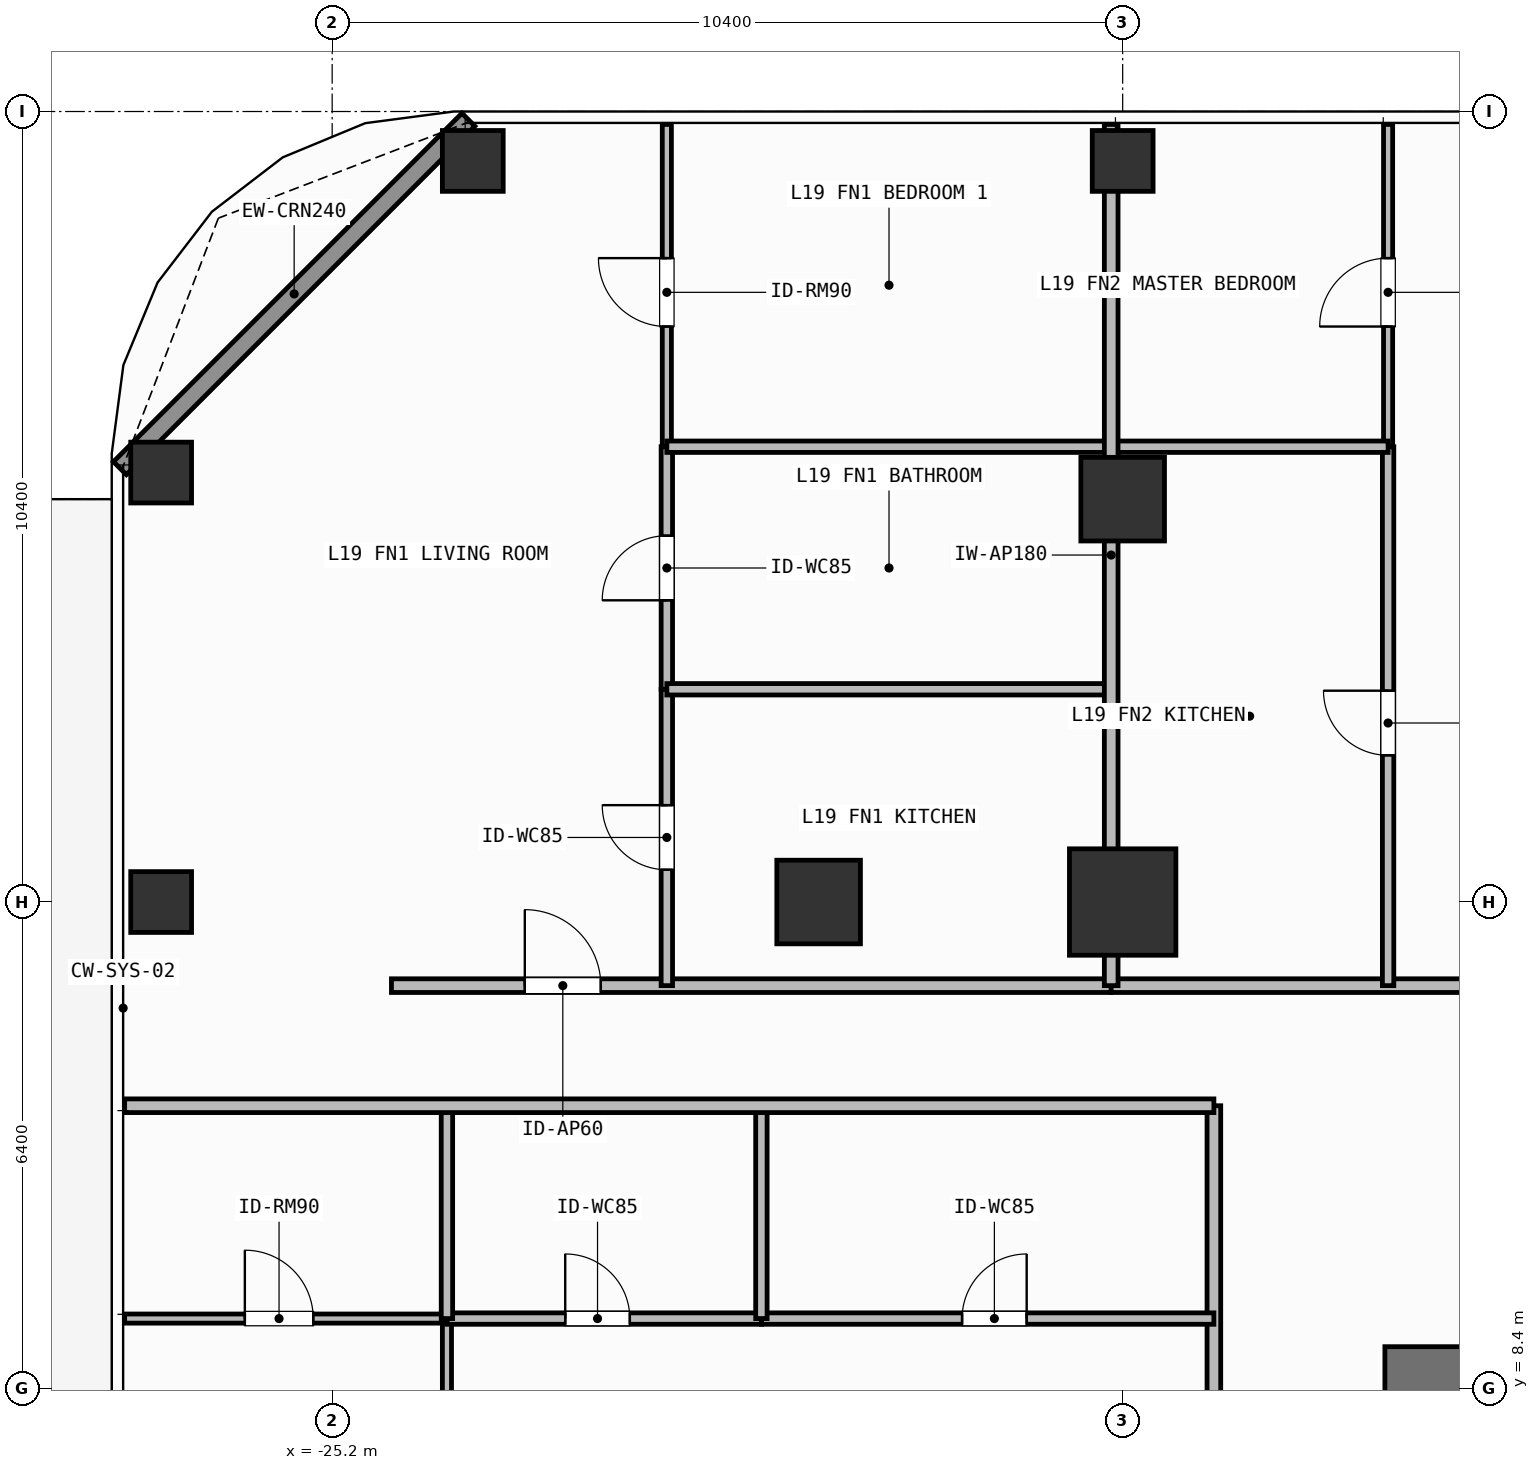
"""IFC4 building model, lengths in metres.
Left out: names, types, materials, properties, quantities, classifications, styles, units other than length and angle.
Written with IfcOpenShell. Run it as: python <this file> out.ifc"""

import sys

from ifc_helpers import new_model, si_unit, direction, frame, frame_2d, origin, origin_2d, place, context, subcontext, project, spatial, rectangle, hollow_rectangle, extrude, element, fill, save


model = new_model("IFC4")
c1 = context("Model", 3, precision=1e-05, world=origin(), true_north=direction((0.0, 1.0)))
c2 = subcontext(c1, "Body", "Model", "MODEL_VIEW")
j1 = project(units=[si_unit("LENGTHUNIT", "METRE"), si_unit("PLANEANGLEUNIT", "RADIAN")], contexts=[c1])
p1 = place(None, origin())
s1 = spatial("IfcSite", under=j1, at=p1, CompositionType="ELEMENT")
p2 = place(p1, origin())
s2 = spatial("IfcBuilding", under=s1, at=p2, CompositionType="ELEMENT")
p3 = place(p2, frame((0.0, 0.0, 73.5)))
s3 = spatial("IfcBuildingStorey", under=s2, at=p3, CompositionType="ELEMENT", Elevation=73.5)
p4 = place(p3, frame((-11.35, 8.4, 0.0), z_axis=(0.0, 0.0, 1.0), x_axis=(1.0, 0.0, 0.0)))
e1 = element("IfcWall", 1, at=p4, inside=s3, PredefinedType="SHEAR", context=c2, shape_type="SweptSolid", body=[
    extrude(rectangle(XDim=1.65, YDim=1.1, at=frame_2d((0.825, 0.0))), origin(), (0.0, 0.0, 1.0), 3.9),
])
p5 = place(p3, frame((-14.8, 14.8, 0.0), z_axis=(0.0, 0.0, 1.0), x_axis=(1.0, 0.0, 0.0)))
e2 = element("IfcColumn", 2, at=p5, inside=s3, PredefinedType="COLUMN", context=c2, shape_type="SweptSolid", body=[
    extrude(rectangle(XDim=1.4, YDim=1.4, at=origin_2d()), origin(), (0.0, 0.0, 1.0), 3.9),
])
for number, where, z_axis, x_axis in (
    (3, (-18.8, 14.8, 0.0), (0.0, 0.0, 1.0), (1.0, 0.0, 0.0)),
    (4, (-14.8, 20.1, 0.0), (0.0, 0.0, 1.0), (1.0, 0.0, 0.0)),
):
    element("IfcColumn", number, at=place(p3, frame(where, z_axis=z_axis, x_axis=x_axis)), inside=s3, PredefinedType="COLUMN", context=c2, shape_type="SweptSolid", body=[
        extrude(rectangle(XDim=1.1, YDim=1.1, at=origin_2d()), origin(), (0.0, 0.0, 1.0), 3.9),
    ])
for number, where, z_axis, x_axis in (
    (5, (-23.35, 24.55, 0.0), (0.0, 0.0, 1.0), (1.0, 0.0, 0.0)),
    (6, (-27.45, 20.45, 0.0), (0.0, 0.0, 1.0), (1.0, 0.0, 0.0)),
    (7, (-14.8, 24.55, 0.0), (0.0, 0.0, 1.0), (1.0, 0.0, 0.0)),
    (8, (-27.45, 14.8, 0.0), (0.0, 0.0, 1.0), (1.0, 0.0, 0.0)),
):
    element("IfcColumn", number, at=place(p3, frame(where, z_axis=z_axis, x_axis=x_axis)), inside=s3, PredefinedType="COLUMN", context=c2, shape_type="SweptSolid", body=[
        extrude(hollow_rectangle(XDim=0.8, YDim=0.8, WallThickness=0.036, at=origin_2d()), origin(), (0.0, 0.0, 1.0), 3.9),
    ])
p6 = place(p3, frame((-27.992, 20.508, 0.0), z_axis=(0.0, 0.0, 1.0), x_axis=(0.707106781187, 0.707106781187, 0.0)))
e9 = element("IfcWall", 9, at=p6, inside=s3, PredefinedType="SOLIDWALL", context=c2, shape_type="SweptSolid", body=[
    extrude(rectangle(XDim=6.484, YDim=0.24, at=frame_2d((3.242, 0.0))), origin(), (0.0, 0.0, 1.0), 3.6),
])
p7 = place(p3, frame((-24.42, 13.7, 0.0), z_axis=(0.0, 0.0, 1.0), x_axis=(1.0, 0.0, 0.0)))
e10 = element("IfcWall", 10, at=p7, inside=s3, PredefinedType="PARTITIONING", context=c2, shape_type="SweptSolid", body=[
    extrude(rectangle(XDim=9.469, YDim=0.18, at=frame_2d((4.734, 0.0))), origin(), (0.0, 0.0, 1.0), 3.6),
])
p8 = place(p7, frame((1.754, 0.0, 0.0)))
e11 = element("IfcOpeningElement", 11, at=p8, cuts=e10, PredefinedType="OPENING", context=c2, shape_type="SweptSolid", body=[
    extrude(rectangle(XDim=1.0, YDim=2.2, at=frame_2d((0.5, 1.1))), frame((0.0, 0.1, 0.0), z_axis=(0.0, -1.0, 0.0), x_axis=(1.0, 0.0, 0.0)), (0.0, 0.0, 1.0), 0.2),
])
p9 = place(p3, frame((-20.797, 13.7, 0.0), z_axis=(0.0, 0.0, 1.0), x_axis=(0.0, 1.0, 0.0)))
e12 = element("IfcWall", 12, at=p9, inside=s3, PredefinedType="PARTITIONING", context=c2, shape_type="SweptSolid", body=[
    extrude(rectangle(XDim=3.899, YDim=0.15, at=frame_2d((1.95, 0.0))), origin(), (0.0, 0.0, 1.0), 3.6),
])
p10 = place(p9, frame((1.524, 0.0, 0.0)))
e13 = element("IfcOpeningElement", 13, at=p10, cuts=e12, PredefinedType="OPENING", context=c2, shape_type="SweptSolid", body=[
    extrude(rectangle(XDim=0.85, YDim=2.1, at=frame_2d((0.425, 1.05))), frame((0.0, 0.085, 0.0), z_axis=(0.0, -1.0, 0.0), x_axis=(1.0, 0.0, 0.0)), (0.0, 0.0, 1.0), 0.17),
])
p11 = place(p3, frame((-20.797, 17.599, 0.0), z_axis=(0.0, 0.0, 1.0), x_axis=(0.0, 1.0, 0.0)))
e14 = element("IfcWall", 14, at=p11, inside=s3, PredefinedType="PARTITIONING", context=c2, shape_type="SweptSolid", body=[
    extrude(rectangle(XDim=3.191, YDim=0.15, at=frame_2d((1.595, 0.0))), origin(), (0.0, 0.0, 1.0), 3.6),
])
p12 = place(p11, frame((1.17, 0.0, 0.0)))
e15 = element("IfcOpeningElement", 15, at=p12, cuts=e14, PredefinedType="OPENING", context=c2, shape_type="SweptSolid", body=[
    extrude(rectangle(XDim=0.85, YDim=2.1, at=frame_2d((0.425, 1.05))), frame((0.0, 0.085, 0.0), z_axis=(0.0, -1.0, 0.0), x_axis=(1.0, 0.0, 0.0)), (0.0, 0.0, 1.0), 0.17),
])
p13 = place(p3, frame((-20.797, 20.79, 0.0), z_axis=(0.0, 0.0, 1.0), x_axis=(0.0, 1.0, 0.0)))
e16 = element("IfcWall", 16, at=p13, inside=s3, PredefinedType="PARTITIONING", context=c2, shape_type="SweptSolid", body=[
    extrude(rectangle(XDim=4.24, YDim=0.12, at=frame_2d((2.12, 0.0))), origin(), (0.0, 0.0, 1.0), 3.6),
])
p14 = place(p13, frame((1.581, 0.0, 0.0)))
e17 = element("IfcOpeningElement", 17, at=p14, cuts=e16, PredefinedType="OPENING", context=c2, shape_type="SweptSolid", body=[
    extrude(rectangle(XDim=0.9, YDim=2.1, at=frame_2d((0.45, 1.05))), frame((0.0, 0.07, 0.0), z_axis=(0.0, -1.0, 0.0), x_axis=(1.0, 0.0, 0.0)), (0.0, 0.0, 1.0), 0.14),
])
p15 = place(p3, frame((-14.951, 13.7, 0.0), z_axis=(0.0, 0.0, 1.0), x_axis=(1.0, 0.0, 0.0)))
e18 = element("IfcWall", 18, at=p15, inside=s3, PredefinedType="PARTITIONING", context=c2, shape_type="SweptSolid", body=[
    extrude(rectangle(XDim=12.051, YDim=0.18, at=frame_2d((6.025, 0.0))), origin(), (0.0, 0.0, 1.0), 3.6),
])
p16 = place(p15, frame((5.704, 0.0, 0.0)))
e19 = element("IfcOpeningElement", 19, at=p16, cuts=e18, PredefinedType="OPENING", context=c2, shape_type="SweptSolid", body=[
    extrude(rectangle(XDim=1.0, YDim=2.2, at=frame_2d((0.5, 1.1))), frame((0.0, 0.1, 0.0), z_axis=(0.0, -1.0, 0.0), x_axis=(1.0, 0.0, 0.0)), (0.0, 0.0, 1.0), 0.2),
])
p17 = place(p3, frame((-11.308, 13.7, 0.0), z_axis=(0.0, 0.0, 1.0), x_axis=(0.0, 1.0, 0.0)))
e20 = element("IfcWall", 20, at=p17, inside=s3, PredefinedType="PARTITIONING", context=c2, shape_type="SweptSolid", body=[
    extrude(rectangle(XDim=7.09, YDim=0.15, at=frame_2d((3.545, 0.0))), origin(), (0.0, 0.0, 1.0), 3.29),
])
p18 = place(p17, frame((3.03, 0.0, 0.0)))
e21 = element("IfcOpeningElement", 21, at=p18, cuts=e20, PredefinedType="OPENING", context=c2, shape_type="SweptSolid", body=[
    extrude(rectangle(XDim=0.85, YDim=2.1, at=frame_2d((0.425, 1.05))), frame((0.0, 0.085, 0.0), z_axis=(0.0, -1.0, 0.0), x_axis=(1.0, 0.0, 0.0)), (0.0, 0.0, 1.0), 0.17),
])
p19 = place(p3, frame((-11.308, 20.79, 0.0), z_axis=(0.0, 0.0, 1.0), x_axis=(0.0, 1.0, 0.0)))
e22 = element("IfcWall", 22, at=p19, inside=s3, PredefinedType="PARTITIONING", context=c2, shape_type="SweptSolid", body=[
    extrude(rectangle(XDim=4.24, YDim=0.12, at=frame_2d((2.12, 0.0))), origin(), (0.0, 0.0, 1.0), 3.29),
])
p20 = place(p19, frame((1.581, 0.0, 0.0)))
e23 = element("IfcOpeningElement", 23, at=p20, cuts=e22, PredefinedType="OPENING", context=c2, shape_type="SweptSolid", body=[
    extrude(rectangle(XDim=0.9, YDim=2.1, at=frame_2d((0.45, 1.05))), frame((0.0, 0.07, 0.0), z_axis=(0.0, -1.0, 0.0), x_axis=(1.0, 0.0, 0.0)), (0.0, 0.0, 1.0), 0.14),
])
p21 = place(p3, frame((-13.6, -0.873, 0.0), z_axis=(0.0, 0.0, 1.0), x_axis=(0.0, 1.0, 0.0)))
e24 = element("IfcWall", 24, at=p21, inside=s3, PredefinedType="PARTITIONING", context=c2, shape_type="SweptSolid", body=[
    extrude(rectangle(XDim=12.993, YDim=0.18, at=frame_2d((6.497, 0.0))), origin(), (0.0, 0.0, 1.0), 3.6),
])
p22 = place(p21, frame((6.446, 0.0, 0.0)))
e25 = element("IfcOpeningElement", 25, at=p22, cuts=e24, PredefinedType="OPENING", context=c2, shape_type="SweptSolid", body=[
    extrude(rectangle(XDim=1.0, YDim=2.2, at=frame_2d((0.5, 1.1))), frame((0.0, 0.1, 0.0), z_axis=(0.0, -1.0, 0.0), x_axis=(1.0, 0.0, 0.0)), (0.0, 0.0, 1.0), 0.2),
])
p23 = place(p3, frame((-23.69, 3.097, 0.0), z_axis=(0.0, 0.0, 1.0), x_axis=(0.0, 1.0, 0.0)))
e26 = element("IfcWall", 26, at=p23, inside=s3, PredefinedType="PARTITIONING", context=c2, shape_type="SweptSolid", body=[
    extrude(rectangle(XDim=6.223, YDim=0.12, at=frame_2d((3.112, 0.0))), origin(), (0.0, 0.0, 1.0), 3.6),
])
p24 = place(p23, frame((2.662, 0.0, 0.0)))
e27 = element("IfcOpeningElement", 27, at=p24, cuts=e26, PredefinedType="OPENING", context=c2, shape_type="SweptSolid", body=[
    extrude(rectangle(XDim=0.9, YDim=2.1, at=frame_2d((0.45, 1.05))), frame((0.0, 0.07, 0.0), z_axis=(0.0, -1.0, 0.0), x_axis=(1.0, 0.0, 0.0)), (0.0, 0.0, 1.0), 0.14),
])
p25 = place(p3, frame((-23.69, 9.32, 0.0), z_axis=(0.0, 0.0, 1.0), x_axis=(1.0, 0.0, 0.0)))
e28 = element("IfcWall", 28, at=p25, inside=s3, PredefinedType="PARTITIONING", context=c2, shape_type="SweptSolid", body=[
    extrude(rectangle(XDim=4.137, YDim=0.15, at=frame_2d((2.068, 0.0))), origin(), (0.0, 0.0, 1.0), 3.6),
])
p26 = place(p25, frame((1.556, 0.0, 0.0)))
e29 = element("IfcOpeningElement", 29, at=p26, cuts=e28, PredefinedType="OPENING", context=c2, shape_type="SweptSolid", body=[
    extrude(rectangle(XDim=0.85, YDim=2.1, at=frame_2d((0.425, 1.05))), frame((0.0, 0.085, 0.0), z_axis=(0.0, -1.0, 0.0), x_axis=(1.0, 0.0, 0.0)), (0.0, 0.0, 1.0), 0.17),
])
p27 = place(p3, frame((-19.553, 9.32, 0.0), z_axis=(0.0, 0.0, 1.0), x_axis=(1.0, 0.0, 0.0)))
e30 = element("IfcWall", 30, at=p27, inside=s3, PredefinedType="PARTITIONING", context=c2, shape_type="SweptSolid", body=[
    extrude(rectangle(XDim=5.953, YDim=0.15, at=frame_2d((2.977, 0.0))), origin(), (0.0, 0.0, 1.0), 3.6),
])
p28 = place(p27, frame((2.64, 0.0, 0.0)))
e31 = element("IfcOpeningElement", 31, at=p28, cuts=e30, PredefinedType="OPENING", context=c2, shape_type="SweptSolid", body=[
    extrude(rectangle(XDim=0.85, YDim=2.1, at=frame_2d((0.425, 1.05))), frame((0.0, 0.085, 0.0), z_axis=(0.0, -1.0, 0.0), x_axis=(1.0, 0.0, 0.0)), (0.0, 0.0, 1.0), 0.17),
])
p29 = place(p3, frame((-27.93, 9.32, 0.0), z_axis=(0.0, 0.0, 1.0), x_axis=(1.0, 0.0, 0.0)))
e32 = element("IfcWall", 32, at=p29, inside=s3, PredefinedType="PARTITIONING", context=c2, shape_type="SweptSolid", body=[
    extrude(rectangle(XDim=4.24, YDim=0.12, at=frame_2d((2.12, 0.0))), origin(), (0.0, 0.0, 1.0), 3.6),
])
p30 = place(p29, frame((1.581, 0.0, 0.0)))
e33 = element("IfcOpeningElement", 33, at=p30, cuts=e32, PredefinedType="OPENING", context=c2, shape_type="SweptSolid", body=[
    extrude(rectangle(XDim=0.9, YDim=2.1, at=frame_2d((0.45, 1.05))), frame((0.0, 0.07, 0.0), z_axis=(0.0, -1.0, 0.0), x_axis=(1.0, 0.0, 0.0)), (0.0, 0.0, 1.0), 0.14),
])
for number, where, z_axis, x_axis in (
    (34, (-20.797, 17.599, 0.0), (0.0, 0.0, 1.0), (1.0, 0.0, 0.0)),
    (35, (-20.797, 20.79, 0.0), (0.0, 0.0, 1.0), (1.0, 0.0, 0.0)),
):
    element("IfcWall", number, at=place(p3, frame(where, z_axis=z_axis, x_axis=x_axis)), inside=s3, PredefinedType="PARTITIONING", context=c2, shape_type="SweptSolid", body=[
        extrude(rectangle(XDim=5.846, YDim=0.15, at=frame_2d((2.923, 0.0))), origin(), (0.0, 0.0, 1.0), 3.6),
    ])
p31 = place(p3, frame((-14.951, 20.79, 0.0), z_axis=(0.0, 0.0, 1.0), x_axis=(1.0, 0.0, 0.0)))
e36 = element("IfcWall", 36, at=p31, inside=s3, PredefinedType="PARTITIONING", context=c2, shape_type="SweptSolid", body=[
    extrude(rectangle(XDim=3.643, YDim=0.15, at=frame_2d((1.821, 0.0))), origin(), (0.0, 0.0, 1.0), 3.6),
])
p32 = place(p3, frame((-14.951, 13.7, 0.0), z_axis=(0.0, 0.0, 1.0), x_axis=(0.0, 1.0, 0.0)))
e37 = element("IfcWall", 37, at=p32, inside=s3, PredefinedType="PARTITIONING", context=c2, shape_type="SweptSolid", body=[
    extrude(rectangle(XDim=11.33, YDim=0.18, at=frame_2d((5.665, 0.0))), origin(), (0.0, 0.0, 1.0), 3.002),
])
for number, where, z_axis, x_axis in (
    (38, (-19.553, 9.32, 0.0), (0.0, 0.0, 1.0), (0.0, 1.0, 0.0)),
    (39, (-23.69, 9.32, 0.0), (0.0, 0.0, 1.0), (0.0, 1.0, 0.0)),
):
    element("IfcWall", number, at=place(p3, frame(where, z_axis=z_axis, x_axis=x_axis)), inside=s3, PredefinedType="PARTITIONING", context=c2, shape_type="SweptSolid", body=[
        extrude(rectangle(XDim=2.8, YDim=0.15, at=frame_2d((1.4, 0.0))), origin(), (0.0, 0.0, 1.0), 3.6),
    ])
p33 = place(p3, frame((-27.93, 12.12, 0.0), z_axis=(0.0, 0.0, 1.0), x_axis=(1.0, 0.0, 0.0)))
e40 = element("IfcWall", 40, at=p33, inside=s3, PredefinedType="PARTITIONING", context=c2, shape_type="SweptSolid", body=[
    extrude(rectangle(XDim=14.33, YDim=0.18, at=frame_2d((7.165, 0.0))), origin(), (0.0, 0.0, 1.0), 3.6),
])
p34 = place(p8, origin())
e41 = element("IfcDoor", 41, at=p34, inside=s3, OperationType="SINGLE_SWING_LEFT", PredefinedType="DOOR", context=c2, shape_type="SweptSolid", body=[
    extrude(rectangle(XDim=1.0, YDim=2.2, at=frame_2d((0.5, 1.1))), frame((0.0, 0.025, 0.0), z_axis=(0.0, -1.0, 0.0), x_axis=(1.0, 0.0, 0.0)), (0.0, 0.0, 1.0), 0.05),
])
fill(e11, e41)
p35 = place(p10, origin())
e42 = element("IfcDoor", 42, at=p35, inside=s3, OperationType="SINGLE_SWING_RIGHT", PredefinedType="DOOR", context=c2, shape_type="SweptSolid", body=[
    extrude(rectangle(XDim=0.85, YDim=2.1, at=frame_2d((0.425, 1.05))), frame((0.0, 0.025, 0.0), z_axis=(0.0, -1.0, 0.0), x_axis=(1.0, 0.0, 0.0)), (0.0, 0.0, 1.0), 0.05),
])
fill(e13, e42)
p36 = place(p12, origin())
e43 = element("IfcDoor", 43, at=p36, inside=s3, OperationType="SINGLE_SWING_LEFT", PredefinedType="DOOR", context=c2, shape_type="SweptSolid", body=[
    extrude(rectangle(XDim=0.85, YDim=2.1, at=frame_2d((0.425, 1.05))), frame((0.0, 0.025, 0.0), z_axis=(0.0, -1.0, 0.0), x_axis=(1.0, 0.0, 0.0)), (0.0, 0.0, 1.0), 0.05),
])
fill(e15, e43)
p37 = place(p14, origin())
e44 = element("IfcDoor", 44, at=p37, inside=s3, OperationType="SINGLE_SWING_RIGHT", PredefinedType="DOOR", context=c2, shape_type="SweptSolid", body=[
    extrude(rectangle(XDim=0.9, YDim=2.1, at=frame_2d((0.45, 1.05))), frame((0.0, 0.025, 0.0), z_axis=(0.0, -1.0, 0.0), x_axis=(1.0, 0.0, 0.0)), (0.0, 0.0, 1.0), 0.05),
])
fill(e17, e44)
p38 = place(p18, origin())
e45 = element("IfcDoor", 45, at=p38, inside=s3, OperationType="SINGLE_SWING_RIGHT", PredefinedType="DOOR", context=c2, shape_type="SweptSolid", body=[
    extrude(rectangle(XDim=0.85, YDim=2.1, at=frame_2d((0.425, 1.05))), frame((0.0, 0.025, 0.0), z_axis=(0.0, -1.0, 0.0), x_axis=(1.0, 0.0, 0.0)), (0.0, 0.0, 1.0), 0.05),
])
fill(e21, e45)
p39 = place(p20, origin())
e46 = element("IfcDoor", 46, at=p39, inside=s3, OperationType="SINGLE_SWING_LEFT", PredefinedType="DOOR", context=c2, shape_type="SweptSolid", body=[
    extrude(rectangle(XDim=0.9, YDim=2.1, at=frame_2d((0.45, 1.05))), frame((0.0, 0.025, 0.0), z_axis=(0.0, -1.0, 0.0), x_axis=(1.0, 0.0, 0.0)), (0.0, 0.0, 1.0), 0.05),
])
fill(e23, e46)
p40 = place(p26, origin())
e47 = element("IfcDoor", 47, at=p40, inside=s3, OperationType="SINGLE_SWING_LEFT", PredefinedType="DOOR", context=c2, shape_type="SweptSolid", body=[
    extrude(rectangle(XDim=0.85, YDim=2.1, at=frame_2d((0.425, 1.05))), frame((0.0, 0.025, 0.0), z_axis=(0.0, -1.0, 0.0), x_axis=(1.0, 0.0, 0.0)), (0.0, 0.0, 1.0), 0.05),
])
fill(e29, e47)
p41 = place(p28, origin())
e48 = element("IfcDoor", 48, at=p41, inside=s3, OperationType="SINGLE_SWING_RIGHT", PredefinedType="DOOR", context=c2, shape_type="SweptSolid", body=[
    extrude(rectangle(XDim=0.85, YDim=2.1, at=frame_2d((0.425, 1.05))), frame((0.0, 0.025, 0.0), z_axis=(0.0, -1.0, 0.0), x_axis=(1.0, 0.0, 0.0)), (0.0, 0.0, 1.0), 0.05),
])
fill(e31, e48)
p42 = place(p30, origin())
e49 = element("IfcDoor", 49, at=p42, inside=s3, OperationType="SINGLE_SWING_LEFT", PredefinedType="DOOR", context=c2, shape_type="SweptSolid", body=[
    extrude(rectangle(XDim=0.9, YDim=2.1, at=frame_2d((0.45, 1.05))), frame((0.0, 0.025, 0.0), z_axis=(0.0, -1.0, 0.0), x_axis=(1.0, 0.0, 0.0)), (0.0, 0.0, 1.0), 0.05),
])
fill(e33, e49)
save(model, sys.argv[1])
